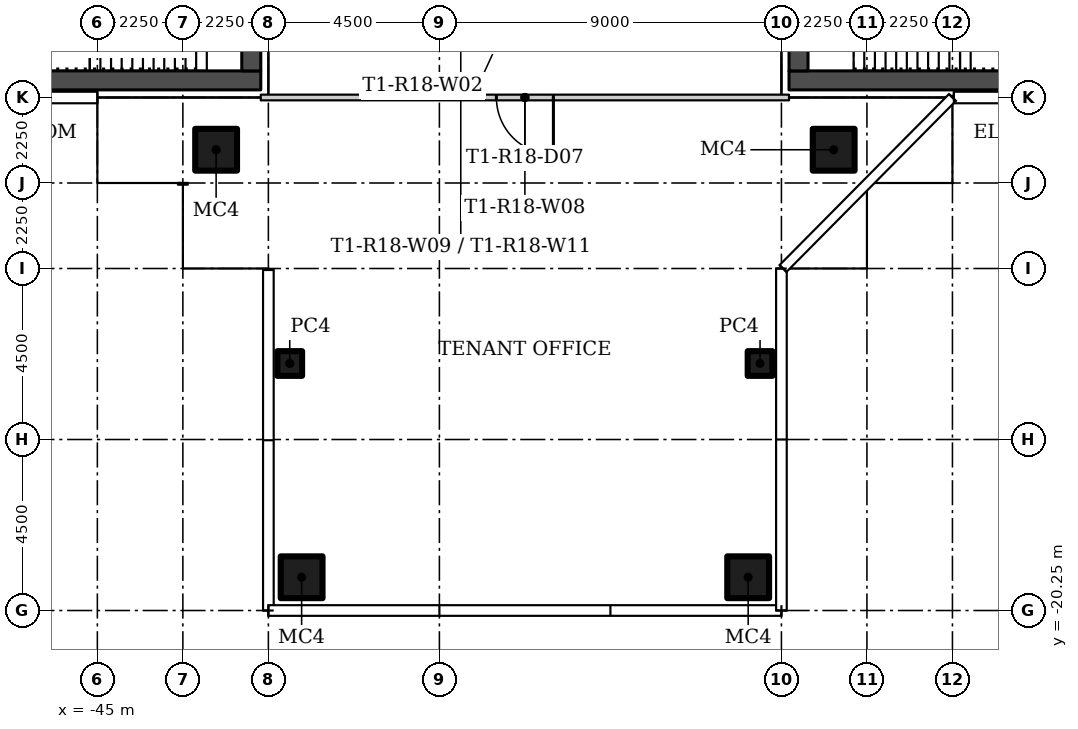
"""IFC4 building model, lengths in metres.
Left out: names, types, materials, properties, quantities, classifications, styles, units other than length and angle.
Written with IfcOpenShell. Run it as: python <this file> out.ifc"""

import sys

from ifc_helpers import new_model, si_unit, direction, frame, frame_2d, origin, origin_2d, place, context, subcontext, project, spatial, rectangle, hollow_rectangle, extrude, element, fill, save


model = new_model("IFC4")
c1 = context("Model", 3, precision=1e-05, world=origin(), true_north=direction((0.0, 1.0)))
c2 = subcontext(c1, "Body", "Model", "MODEL_VIEW")
j1 = project(units=[si_unit("LENGTHUNIT", "METRE"), si_unit("PLANEANGLEUNIT", "RADIAN")], contexts=[c1])
p1 = place(None, origin())
s1 = spatial("IfcSite", under=j1, at=p1, CompositionType="ELEMENT")
p2 = place(p1, origin())
s2 = spatial("IfcBuilding", under=s1, at=p2, CompositionType="ELEMENT")
p3 = place(p2, frame((0.0, 0.0, 162.3)))
s3 = spatial("IfcBuildingStorey", under=s2, at=p3, CompositionType="ELEMENT", Elevation=162.3)
for number, where in (
    (1, (-25.625, -8.125, 0.0)),
    (2, (-41.875, -8.125, 0.0)),
):
    element("IfcColumn", number, at=place(p3, frame(where)), inside=s3, PredefinedType="COLUMN", context=c2, shape_type="SweptSolid", body=[
        extrude(hollow_rectangle(XDim=1.1, YDim=1.1, WallThickness=0.04, at=origin_2d()), origin(), (0.0, 0.0, 1.0), 3.55),
    ])
p4 = place(p3, frame((-39.938, -13.75, 0.0)))
e3 = element("IfcColumn", 3, at=p4, inside=s3, PredefinedType="COLUMN", context=c2, shape_type="SweptSolid", body=[
    extrude(hollow_rectangle(XDim=0.65, YDim=0.65, WallThickness=0.02, at=origin_2d()), origin(), (0.0, 0.0, 1.0), 3.55),
])
p5 = place(p3, frame((-39.625, -19.375, 0.0)))
e4 = element("IfcColumn", 4, at=p5, inside=s3, PredefinedType="COLUMN", context=c2, shape_type="SweptSolid", body=[
    extrude(hollow_rectangle(XDim=1.1, YDim=1.1, WallThickness=0.04, at=origin_2d()), origin(), (0.0, 0.0, 1.0), 3.55),
])
p6 = place(p3, frame((-27.562, -13.75, 0.0)))
e5 = element("IfcColumn", 5, at=p6, inside=s3, PredefinedType="COLUMN", context=c2, shape_type="SweptSolid", body=[
    extrude(hollow_rectangle(XDim=0.65, YDim=0.65, WallThickness=0.02, at=origin_2d()), origin(), (0.0, 0.0, 1.0), 3.55),
])
p7 = place(p3, frame((-27.875, -19.375, 0.0)))
e6 = element("IfcColumn", 6, at=p7, inside=s3, PredefinedType="COLUMN", context=c2, shape_type="SweptSolid", body=[
    extrude(hollow_rectangle(XDim=1.1, YDim=1.1, WallThickness=0.04, at=origin_2d()), origin(), (0.0, 0.0, 1.0), 3.55),
])
p8 = place(p3, frame((-26.8, -6.75, 0.0), z_axis=(0.0, 0.0, 1.0), x_axis=(-1.0, 0.0, 0.0)))
e7 = element("IfcWall", 7, at=p8, inside=s3, PredefinedType="PARTITIONING", context=c2, shape_type="SweptSolid", body=[
    extrude(rectangle(XDim=13.9, YDim=0.15, at=frame_2d((6.95, 0.0))), origin(), (0.0, 0.0, 1.0), 3.55),
])
p9 = place(p8, frame((6.2, 0.0, 0.0)))
e8 = element("IfcOpeningElement", 8, at=p9, cuts=e7, PredefinedType="OPENING", context=c2, shape_type="SweptSolid", body=[
    extrude(rectangle(XDim=1.5, YDim=2.1, at=frame_2d((0.75, 1.05))), frame((0.0, 0.085, 0.0), z_axis=(0.0, -1.0, 0.0), x_axis=(1.0, 0.0, 0.0)), (0.0, 0.0, 1.0), 0.17),
])
p10 = place(p3, frame((-26.8, -6.3, 0.0)))
e9 = element("IfcWall", 9, at=p10, inside=s3, PredefinedType="SHEAR", context=c2, shape_type="SweptSolid", body=[
    extrude(rectangle(XDim=13.1, YDim=0.5, at=frame_2d((6.55, 0.0))), origin(), (0.0, 0.0, 1.0), 3.55),
])
p11 = place(p3, frame((-26.55, 6.05, 0.0), z_axis=(0.0, 0.0, 1.0), x_axis=(0.0, -1.0, 0.0)))
e10 = element("IfcWall", 10, at=p11, inside=s3, PredefinedType="SHEAR", context=c2, shape_type="SweptSolid", body=[
    extrude(rectangle(XDim=12.1, YDim=0.5, at=frame_2d((6.05, 0.0))), origin(), (0.0, 0.0, 1.0), 3.55),
])
p12 = place(p11, frame((3.9, 0.0, 0.0)))
e11 = element("IfcOpeningElement", 11, at=p12, cuts=e10, PredefinedType="OPENING", context=c2, shape_type="SweptSolid", body=[
    extrude(rectangle(XDim=1.8, YDim=2.4, at=frame_2d((0.9, 1.2))), frame((0.0, 0.26, 0.0), z_axis=(0.0, -1.0, 0.0), x_axis=(1.0, 0.0, 0.0)), (0.0, 0.0, 1.0), 0.52),
])
p13 = place(p3, frame((-40.7, -6.3, 0.0), z_axis=(0.0, 0.0, 1.0), x_axis=(-1.0, 0.0, 0.0)))
e12 = element("IfcWall", 12, at=p13, inside=s3, PredefinedType="SHEAR", context=c2, shape_type="SweptSolid", body=[
    extrude(rectangle(XDim=13.1, YDim=0.5, at=frame_2d((6.55, 0.0))), origin(), (0.0, 0.0, 1.0), 3.55),
])
p14 = place(p3, frame((-40.95, -6.05, 0.0), z_axis=(0.0, 0.0, 1.0), x_axis=(0.0, 1.0, 0.0)))
e13 = element("IfcWall", 13, at=p14, inside=s3, PredefinedType="SHEAR", context=c2, shape_type="SweptSolid", body=[
    extrude(rectangle(XDim=12.1, YDim=0.5, at=frame_2d((6.05, 0.0))), origin(), (0.0, 0.0, 1.0), 3.55),
])
p15 = place(p14, frame((6.4, 0.0, 0.0)))
e14 = element("IfcOpeningElement", 14, at=p15, cuts=e13, PredefinedType="OPENING", context=c2, shape_type="SweptSolid", body=[
    extrude(rectangle(XDim=1.8, YDim=2.4, at=frame_2d((0.9, 1.2))), frame((0.0, 0.26, 0.0), z_axis=(0.0, -1.0, 0.0), x_axis=(1.0, 0.0, 0.0)), (0.0, 0.0, 1.0), 0.52),
])
p16 = place(p9, origin())
e15 = element("IfcDoor", 15, at=p16, inside=s3, OperationType="DOUBLE_DOOR_SINGLE_SWING", PredefinedType="DOOR", context=c2, shape_type="SweptSolid", body=[
    extrude(rectangle(XDim=1.5, YDim=2.1, at=frame_2d((0.75, 1.05))), frame((0.0, 0.025, 0.0), z_axis=(0.0, -1.0, 0.0), x_axis=(1.0, 0.0, 0.0)), (0.0, 0.0, 1.0), 0.05),
])
fill(e8, e15)
save(model, sys.argv[1])
